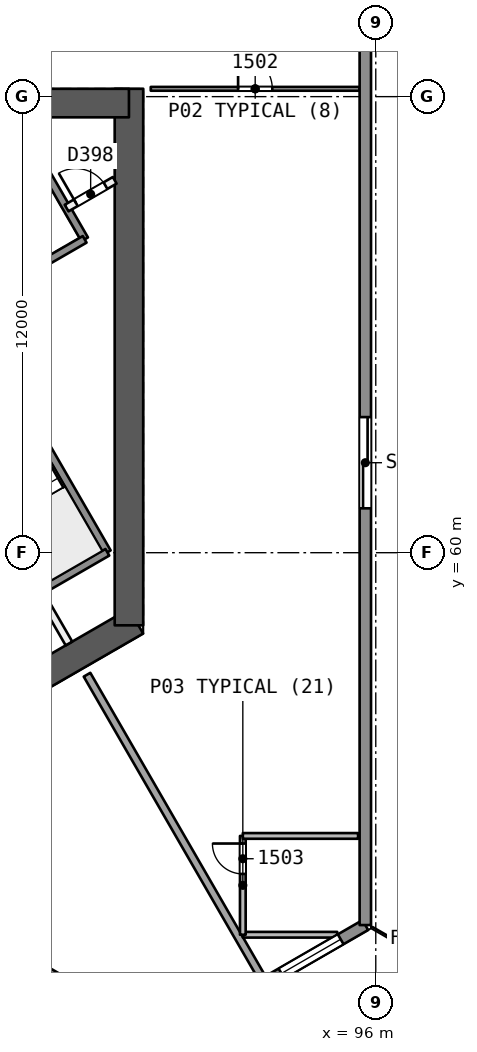
"""IFC4 building model, lengths in metres.
Left out: names, types, materials, properties, quantities, classifications, styles, units other than length and angle.
Written with IfcOpenShell. Run it as: python <this file> out.ifc"""

import sys

from ifc_helpers import new_model, si_unit, direction, frame, frame_2d, origin, place, context, subcontext, project, spatial, rectangle, extrude, element, fill, save


model = new_model("IFC4")
c1 = context("Model", 3, precision=1e-05, world=origin(), true_north=direction((0.0, 1.0)))
c2 = subcontext(c1, "Body", "Model", "MODEL_VIEW")
j1 = project(units=[si_unit("LENGTHUNIT", "METRE"), si_unit("PLANEANGLEUNIT", "RADIAN")], contexts=[c1])
p1 = place(None, origin())
s1 = spatial("IfcSite", under=j1, at=p1, CompositionType="ELEMENT")
p2 = place(p1, origin())
s2 = spatial("IfcBuilding", under=s1, at=p2, CompositionType="ELEMENT")
p3 = place(p2, frame((0.0, 0.0, 68.4)))
s3 = spatial("IfcBuildingStorey", under=s2, at=p3, CompositionType="ELEMENT", Elevation=68.4)
p4 = place(p3, frame((86.723, 56.483, 0.0), z_axis=(0.0, 0.0, 1.0), x_axis=(0.866017201164, 0.500014207086, 0.0)))
e1 = element("IfcWall", 1, at=p4, inside=s3, PredefinedType="SHEAR", context=c2, shape_type="SweptSolid", body=[
    extrude(rectangle(XDim=3.429, YDim=0.75, at=frame_2d((1.714, 0.0))), origin(), (0.0, 0.0, 1.0), 3.7),
])
p5 = place(p3, frame((89.505, 58.089, 0.0), z_axis=(0.0, 0.0, 1.0), x_axis=(0.0, 1.0, 0.0)))
e2 = element("IfcWall", 2, at=p5, inside=s3, PredefinedType="SHEAR", context=c2, shape_type="SweptSolid", body=[
    extrude(rectangle(XDim=14.117, YDim=0.75, at=frame_2d((7.059, 0.0))), origin(), (0.0, 0.0, 1.0), 3.7),
])
p6 = place(p3, frame((89.505, 71.831, 0.0), z_axis=(0.0, 0.0, 1.0), x_axis=(-1.0, 0.0, 0.0)))
e3 = element("IfcWall", 3, at=p6, inside=s3, PredefinedType="SHEAR", context=c2, shape_type="SweptSolid", body=[
    extrude(rectangle(XDim=10.005, YDim=0.75, at=frame_2d((5.002, 0.0))), origin(), (0.0, 0.0, 1.0), 3.7),
])
p7 = place(p6, frame((7.855, 0.0, 0.0)))
e4 = element("IfcOpeningElement", 4, at=p7, cuts=e3, PredefinedType="OPENING", context=c2, shape_type="SweptSolid", body=[
    extrude(rectangle(XDim=1.2, YDim=2.1, at=frame_2d((0.6, 1.05))), frame((0.0, 0.385, 0.0), z_axis=(0.0, -1.0, 0.0), x_axis=(1.0, 0.0, 0.0)), (0.0, 0.0, 1.0), 0.771),
])
p8 = place(p3, frame((90.079, 72.206, 0.0), z_axis=(0.0, 0.0, 1.0), x_axis=(1.0, 0.0, 0.0)))
e5 = element("IfcWall", 5, at=p8, inside=s3, PredefinedType="PARTITIONING", context=c2, shape_type="SweptSolid", body=[
    extrude(rectangle(XDim=5.497, YDim=0.1, at=frame_2d((2.748, 0.0))), origin(), (0.0, 0.0, 1.0), 3.2),
])
p9 = place(p8, frame((2.298, 0.0, 0.0)))
e6 = element("IfcOpeningElement", 6, at=p9, cuts=e5, PredefinedType="OPENING", context=c2, shape_type="SweptSolid", body=[
    extrude(rectangle(XDim=0.9, YDim=2.1, at=frame_2d((0.45, 1.05))), frame((0.0, 0.061, 0.0), z_axis=(0.0, -1.0, 0.0), x_axis=(1.0, 0.0, 0.0)), (0.0, 0.0, 1.0), 0.121),
])
p10 = place(p3, frame((94.986, 49.948, 0.0), z_axis=(0.0, 0.0, 1.0), x_axis=(-1.0, 0.0, 0.0)))
e7 = element("IfcWall", 7, at=p10, inside=s3, PredefinedType="PARTITIONING", context=c2, shape_type="SweptSolid", body=[
    extrude(rectangle(XDim=2.484, YDim=0.15, at=frame_2d((1.242, 0.0))), origin(), (0.0, 0.0, 1.0), 3.2),
])
p11 = place(p3, frame((92.501, 49.948, 0.0), z_axis=(0.0, 0.0, 1.0), x_axis=(0.0, 1.0, 0.0)))
e8 = element("IfcWall", 8, at=p11, inside=s3, PredefinedType="PARTITIONING", context=c2, shape_type="SweptSolid", body=[
    extrude(rectangle(XDim=2.6, YDim=0.15, at=frame_2d((1.3, 0.0))), origin(), (0.0, 0.0, 1.0), 3.2),
])
p12 = place(p11, frame((1.6, 0.0, 0.0)))
e9 = element("IfcOpeningElement", 9, at=p12, cuts=e8, PredefinedType="OPENING", context=c2, shape_type="SweptSolid", body=[
    extrude(rectangle(XDim=0.8, YDim=2.1, at=frame_2d((0.4, 1.05))), frame((0.0, 0.085, 0.0), z_axis=(0.0, -1.0, 0.0), x_axis=(1.0, 0.0, 0.0)), (0.0, 0.0, 1.0), 0.171),
])
p13 = place(p3, frame((92.501, 52.548, 0.0), z_axis=(0.0, 0.0, 1.0), x_axis=(1.0, 0.0, 0.0)))
e10 = element("IfcWall", 10, at=p13, inside=s3, PredefinedType="PARTITIONING", context=c2, shape_type="SweptSolid", body=[
    extrude(rectangle(XDim=3.033, YDim=0.15, at=frame_2d((1.517, 0.0))), origin(), (0.0, 0.0, 1.0), 3.2),
])
p14 = place(p3, frame((88.402, 56.789, 0.0), z_axis=(0.0, 0.0, 1.0), x_axis=(0.500010587453, -0.86601929103, 0.0)))
e11 = element("IfcWall", 11, at=p14, inside=s3, PredefinedType="PARTITIONING", context=c2, shape_type="SweptSolid", body=[
    extrude(rectangle(XDim=9.217, YDim=0.2, at=frame_2d((4.608, 0.0))), origin(), (0.0, 0.0, 1.0), 3.2),
])
p15 = place(p3, frame((95.725, 50.202, 0.0), z_axis=(0.0, 0.0, 1.0), x_axis=(-0.866022255349, -0.500005453211, 0.0)))
e12 = element("IfcWall", 12, at=p15, inside=s3, PredefinedType="SOLIDWALL", context=c2, shape_type="SweptSolid", body=[
    extrude(rectangle(XDim=6.099, YDim=0.3, at=frame_2d((3.049, 0.0))), origin(), (0.0, 0.0, 1.0), 3.2),
])
p16 = place(p15, frame((0.749, 0.0, 0.9)))
e13 = element("IfcOpeningElement", 13, at=p16, cuts=e12, PredefinedType="OPENING", context=c2, shape_type="SweptSolid", body=[
    extrude(rectangle(XDim=1.8, YDim=1.5, at=frame_2d((0.9, 0.75))), frame((0.0, 0.161, 0.0), z_axis=(0.0, -1.0, 0.0), x_axis=(1.0, 0.0, 0.0)), (0.0, 0.0, 1.0), 0.321),
])
p17 = place(p15, frame((3.717, 0.0, 0.9)))
e14 = element("IfcOpeningElement", 14, at=p17, cuts=e12, PredefinedType="OPENING", context=c2, shape_type="SweptSolid", body=[
    extrude(rectangle(XDim=1.8, YDim=1.5, at=frame_2d((0.9, 0.75))), frame((0.0, 0.161, 0.0), z_axis=(0.0, -1.0, 0.0), x_axis=(1.0, 0.0, 0.0)), (0.0, 0.0, 1.0), 0.321),
])
p18 = place(p3, frame((95.725, 109.798, 0.0), z_axis=(0.0, 0.0, 1.0), x_axis=(0.0, -1.0, 0.0)))
e15 = element("IfcWall", 15, at=p18, inside=s3, PredefinedType="SOLIDWALL", context=c2, shape_type="SweptSolid", body=[
    extrude(rectangle(XDim=59.596, YDim=0.3, at=frame_2d((29.798, 0.0))), origin(), (0.0, 0.0, 1.0), 3.2),
])
p19 = place(p18, frame((33.43, 0.0, 0.0)))
e16 = element("IfcOpeningElement", 16, at=p19, cuts=e15, PredefinedType="OPENING", context=c2, shape_type="SweptSolid", body=[
    extrude(rectangle(XDim=2.4, YDim=2.4, at=frame_2d((1.2, 1.2))), frame((0.0, 0.161, 0.0), z_axis=(0.0, -1.0, 0.0), x_axis=(1.0, 0.0, 0.0)), (0.0, 0.0, 1.0), 0.321),
])
p20 = place(p18, frame((46.23, 0.0, 0.0)))
e17 = element("IfcOpeningElement", 17, at=p20, cuts=e15, PredefinedType="OPENING", context=c2, shape_type="SweptSolid", body=[
    extrude(rectangle(XDim=2.4, YDim=2.4, at=frame_2d((1.2, 1.2))), frame((0.0, 0.161, 0.0), z_axis=(0.0, -1.0, 0.0), x_axis=(1.0, 0.0, 0.0)), (0.0, 0.0, 1.0), 0.321),
])
p21 = place(p18, frame((22.986, 0.0, 0.0)))
e18 = element("IfcOpeningElement", 18, at=p21, cuts=e15, PredefinedType="OPENING", context=c2, shape_type="SweptSolid", body=[
    extrude(rectangle(XDim=2.4, YDim=2.4, at=frame_2d((1.2, 1.2))), frame((0.0, 0.161, 0.0), z_axis=(0.0, -1.0, 0.0), x_axis=(1.0, 0.0, 0.0)), (0.0, 0.0, 1.0), 0.321),
])
p22 = place(p18, frame((10.995, 0.0, 0.0)))
e19 = element("IfcOpeningElement", 19, at=p22, cuts=e15, PredefinedType="OPENING", context=c2, shape_type="SweptSolid", body=[
    extrude(rectangle(XDim=2.4, YDim=2.4, at=frame_2d((1.2, 1.2))), frame((0.0, 0.161, 0.0), z_axis=(0.0, -1.0, 0.0), x_axis=(1.0, 0.0, 0.0)), (0.0, 0.0, 1.0), 0.321),
])
p23 = place(p18, frame((29.444, 0.0, 0.9)))
e20 = element("IfcOpeningElement", 20, at=p23, cuts=e15, PredefinedType="OPENING", context=c2, shape_type="SweptSolid", body=[
    extrude(rectangle(XDim=1.8, YDim=1.5, at=frame_2d((0.9, 0.75))), frame((0.0, 0.161, 0.0), z_axis=(0.0, -1.0, 0.0), x_axis=(1.0, 0.0, 0.0)), (0.0, 0.0, 1.0), 0.321),
])
p24 = place(p18, frame((26.793, 0.0, 0.9)))
e21 = element("IfcOpeningElement", 21, at=p24, cuts=e15, PredefinedType="OPENING", context=c2, shape_type="SweptSolid", body=[
    extrude(rectangle(XDim=1.8, YDim=1.5, at=frame_2d((0.9, 0.75))), frame((0.0, 0.161, 0.0), z_axis=(0.0, -1.0, 0.0), x_axis=(1.0, 0.0, 0.0)), (0.0, 0.0, 1.0), 0.321),
])
p25 = place(p3, frame((90.443, 47.153, 0.0), z_axis=(0.0, 0.0, 1.0), x_axis=(-0.866024382485, 0.500001768939, 0.0)))
e22 = element("IfcWall", 22, at=p25, inside=s3, PredefinedType="SOLIDWALL", context=c2, shape_type="SweptSolid", body=[
    extrude(rectangle(XDim=59.596, YDim=0.3, at=frame_2d((29.798, 0.0))), origin(), (0.0, 0.0, 1.0), 3.2),
])
p26 = place(p25, frame((28.91, 0.0, 0.0)))
e23 = element("IfcOpeningElement", 23, at=p26, cuts=e22, PredefinedType="OPENING", context=c2, shape_type="SweptSolid", body=[
    extrude(rectangle(XDim=2.4, YDim=2.4, at=frame_2d((1.2, 1.2))), frame((0.0, 0.161, 0.0), z_axis=(0.0, -1.0, 0.0), x_axis=(1.0, 0.0, 0.0)), (0.0, 0.0, 1.0), 0.321),
])
p27 = place(p25, frame((33.586, 0.0, 0.0)))
e24 = element("IfcOpeningElement", 24, at=p27, cuts=e22, PredefinedType="OPENING", context=c2, shape_type="SweptSolid", body=[
    extrude(rectangle(XDim=2.4, YDim=2.4, at=frame_2d((1.2, 1.2))), frame((0.0, 0.161, 0.0), z_axis=(0.0, -1.0, 0.0), x_axis=(1.0, 0.0, 0.0)), (0.0, 0.0, 1.0), 0.321),
])
p28 = place(p25, frame((46.23, 0.0, 0.0)))
e25 = element("IfcOpeningElement", 25, at=p28, cuts=e22, PredefinedType="OPENING", context=c2, shape_type="SweptSolid", body=[
    extrude(rectangle(XDim=2.4, YDim=2.4, at=frame_2d((1.2, 1.2))), frame((0.0, 0.161, 0.0), z_axis=(0.0, -1.0, 0.0), x_axis=(1.0, 0.0, 0.0)), (0.0, 0.0, 1.0), 0.321),
])
p29 = place(p25, frame((12.876, 0.0, 0.0)))
e26 = element("IfcOpeningElement", 26, at=p29, cuts=e22, PredefinedType="OPENING", context=c2, shape_type="SweptSolid", body=[
    extrude(rectangle(XDim=2.4, YDim=2.4, at=frame_2d((1.2, 1.2))), frame((0.0, 0.161, 0.0), z_axis=(0.0, -1.0, 0.0), x_axis=(1.0, 0.0, 0.0)), (0.0, 0.0, 1.0), 0.321),
])
p30 = place(p3, frame((87.09, 59.06, 0.0), z_axis=(0.0, 0.0, 1.0), x_axis=(0.499937194881, -0.866061661301, 0.0)))
e27 = element("IfcWall", 27, at=p30, inside=s3, PredefinedType="PARTITIONING", context=c2, shape_type="SweptSolid", body=[
    extrude(rectangle(XDim=1.673, YDim=0.2, at=frame_2d((0.836, 0.0))), origin(), (0.0, 0.0, 1.0), 3.2),
])
p31 = place(p3, frame((85.087, 66.679, 0.0), z_axis=(0.0, 0.0, 1.0), x_axis=(0.500019787375, -0.866013979237, 0.0)))
e28 = element("IfcWall", 28, at=p31, inside=s3, PredefinedType="SOLIDWALL", context=c2, shape_type="SweptSolid", body=[
    extrude(rectangle(XDim=7.7, YDim=0.2, at=frame_2d((3.85, 0.0))), origin(), (0.0, 0.0, 1.0), 3.2),
])
p32 = place(p31, frame((0.55, 0.0, 0.0)))
e29 = element("IfcOpeningElement", 29, at=p32, cuts=e28, PredefinedType="OPENING", context=c2, shape_type="SweptSolid", body=[
    extrude(rectangle(XDim=1.1, YDim=2.1, at=frame_2d((0.55, 1.05))), frame((0.0, 0.11, 0.0), z_axis=(0.0, -1.0, 0.0), x_axis=(1.0, 0.0, 0.0)), (0.0, 0.0, 1.0), 0.221),
])
p33 = place(p3, frame((86.965, 70.626, 0.0), z_axis=(0.0, 0.0, 1.0), x_axis=(0.499996545922, -0.866027397988, 0.0)))
e30 = element("IfcWall", 30, at=p33, inside=s3, PredefinedType="SOLIDWALL", context=c2, shape_type="SweptSolid", body=[
    extrude(rectangle(XDim=2.75, YDim=0.2, at=frame_2d((1.375, 0.0))), origin(), (0.0, 0.0, 1.0), 3.2),
])
p34 = place(p3, frame((87.865, 69.068, 0.0), z_axis=(0.0, 0.0, 1.0), x_axis=(0.865982457891, 0.500074377092, 0.0)))
e31 = element("IfcWall", 31, at=p34, inside=s3, PredefinedType="PARTITIONING", context=c2, shape_type="SweptSolid", body=[
    extrude(rectangle(XDim=1.461, YDim=0.2, at=frame_2d((0.73, 0.0))), origin(), (0.0, 0.0, 1.0), 3.2),
])
p35 = place(p34, frame((0.281, 0.0, 0.0)))
e32 = element("IfcOpeningElement", 32, at=p35, cuts=e31, PredefinedType="OPENING", context=c2, shape_type="SweptSolid", body=[
    extrude(rectangle(XDim=0.9, YDim=2.1, at=frame_2d((0.45, 1.05))), frame((0.0, 0.11, 0.0), z_axis=(0.0, -1.0, 0.0), x_axis=(1.0, 0.0, 0.0)), (0.0, 0.0, 1.0), 0.221),
])
p36 = place(p3, frame((86.348, 67.095, 0.0), z_axis=(0.0, 0.0, 1.0), x_axis=(0.86602648383, 0.499998129301, 0.0)))
e33 = element("IfcWall", 33, at=p36, inside=s3, PredefinedType="SOLIDWALL", context=c2, shape_type="SweptSolid", body=[
    extrude(rectangle(XDim=2.3, YDim=0.2, at=frame_2d((1.15, 0.0))), origin(), (0.0, 0.0, 1.0), 3.2),
])
p37 = place(p3, frame((85.343, 57.935, 0.0), z_axis=(0.0, 0.0, 1.0), x_axis=(0.866004344652, 0.500036473714, 0.0)))
e34 = element("IfcWall", 34, at=p37, inside=s3, PredefinedType="SOLIDWALL", context=c2, shape_type="SweptSolid", body=[
    extrude(rectangle(XDim=4.15, YDim=0.2, at=frame_2d((2.075, 0.0))), origin(), (0.0, 0.0, 1.0), 3.2),
])
p38 = place(p9, origin())
e35 = element("IfcDoor", 35, at=p38, inside=s3, OperationType="SINGLE_SWING_LEFT", PredefinedType="NOTDEFINED", context=c2, shape_type="SweptSolid", body=[
    extrude(rectangle(XDim=0.9, YDim=2.1, at=frame_2d((0.45, 1.05))), frame((0.0, 0.025, 0.0), z_axis=(0.0, -1.0, 0.0), x_axis=(1.0, 0.0, 0.0)), (0.0, 0.0, 1.0), 0.05),
])
fill(e6, e35)
p39 = place(p12, origin())
e36 = element("IfcDoor", 36, at=p39, inside=s3, OperationType="SINGLE_SWING_RIGHT", PredefinedType="NOTDEFINED", context=c2, shape_type="SweptSolid", body=[
    extrude(rectangle(XDim=0.8, YDim=2.1, at=frame_2d((0.4, 1.05))), frame((0.0, 0.025, 0.0), z_axis=(0.0, -1.0, 0.0), x_axis=(1.0, 0.0, 0.0)), (0.0, 0.0, 1.0), 0.05),
])
fill(e9, e36)
p40 = place(p16, origin())
e37 = element("IfcWindow", 37, at=p40, inside=s3, PartitioningType="SINGLE_PANEL", PredefinedType="WINDOW", context=c2, shape_type="SweptSolid", body=[
    extrude(rectangle(XDim=1.8, YDim=1.5, at=frame_2d((0.9, 0.75))), frame((0.0, 0.03, 0.0), z_axis=(0.0, -1.0, 0.0), x_axis=(1.0, 0.0, 0.0)), (0.0, 0.0, 1.0), 0.06),
])
fill(e13, e37)
p41 = place(p20, origin())
e38 = element("IfcDoor", 38, at=p41, inside=s3, OperationType="SLIDING_TO_RIGHT", PredefinedType="NOTDEFINED", context=c2, shape_type="SweptSolid", body=[
    extrude(rectangle(XDim=2.4, YDim=2.4, at=frame_2d((1.2, 1.2))), frame((0.0, 0.025, 0.0), z_axis=(0.0, -1.0, 0.0), x_axis=(1.0, 0.0, 0.0)), (0.0, 0.0, 1.0), 0.05),
])
fill(e17, e38)
p42 = place(p35, origin())
e39 = element("IfcDoor", 39, at=p42, inside=s3, OperationType="SINGLE_SWING_LEFT", PredefinedType="NOTDEFINED", context=c2, shape_type="SweptSolid", body=[
    extrude(rectangle(XDim=0.9, YDim=2.1, at=frame_2d((0.45, 1.05))), frame((0.0, 0.025, 0.0), z_axis=(0.0, -1.0, 0.0), x_axis=(1.0, 0.0, 0.0)), (0.0, 0.0, 1.0), 0.05),
])
fill(e32, e39)
save(model, sys.argv[1])
